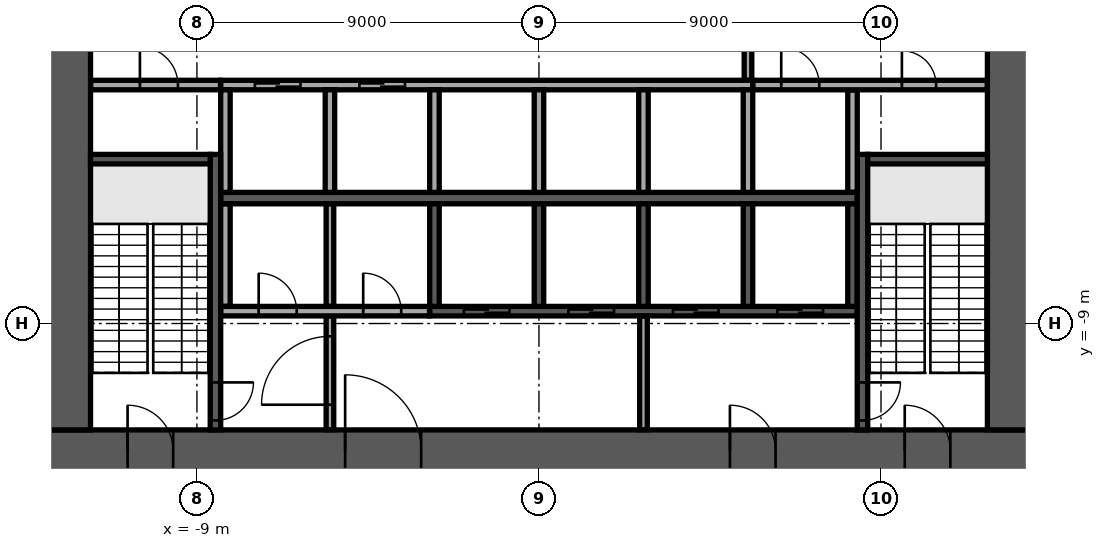
"""IFC4 building model, lengths in metres.
Left out: names, types, materials, properties, quantities, classifications, styles, units other than length and angle.
Written with IfcOpenShell. Run it as: python <this file> out.ifc"""

import sys

from ifc_helpers import new_model, si_unit, direction, frame, frame_2d, origin, place, context, subcontext, project, spatial, rectangle, extrude, element, fill, save


model = new_model("IFC4")
c1 = context("Model", 3, precision=1e-05, world=origin(), true_north=direction((0.0, 1.0)))
c2 = subcontext(c1, "Body", "Model", "MODEL_VIEW")
j1 = project(units=[si_unit("LENGTHUNIT", "METRE"), si_unit("PLANEANGLEUNIT", "RADIAN")], contexts=[c1])
p1 = place(None, origin())
s1 = spatial("IfcSite", under=j1, at=p1, CompositionType="ELEMENT")
p2 = place(p1, origin())
s2 = spatial("IfcBuilding", under=s1, at=p2, CompositionType="ELEMENT")
p3 = place(p2, frame((0.0, 0.0, 130.1)))
s3 = spatial("IfcBuildingStorey", under=s2, at=p3, CompositionType="ELEMENT", Elevation=130.1)
p4 = place(p3, frame((-12.9, -12.35, 0.0), z_axis=(0.0, 0.0, 1.0), x_axis=(1.0, 0.0, 0.0)))
e1 = element("IfcWall", 1, at=p4, inside=s3, PredefinedType="SHEAR", context=c2, shape_type="SweptSolid", body=[
    extrude(rectangle(XDim=25.8, YDim=1.1, at=frame_2d((12.9, 0.0))), origin(), (0.0, 0.0, 1.0), 5.2),
])
p5 = place(p4, frame((7.8, 0.0, 0.0)))
e2 = element("IfcOpeningElement", 2, at=p5, cuts=e1, PredefinedType="OPENING", context=c2, shape_type="SweptSolid", body=[
    extrude(rectangle(XDim=2.0, YDim=2.1, at=frame_2d((1.0, 1.05))), frame((0.0, 0.56, 0.0), z_axis=(0.0, -1.0, 0.0), x_axis=(1.0, 0.0, 0.0)), (0.0, 0.0, 1.0), 1.12),
])
p6 = place(p4, frame((17.925, 0.0, 0.0)))
e3 = element("IfcOpeningElement", 3, at=p6, cuts=e1, PredefinedType="OPENING", context=c2, shape_type="SweptSolid", body=[
    extrude(rectangle(XDim=1.2, YDim=2.1, at=frame_2d((0.6, 1.05))), frame((0.0, 0.56, 0.0), z_axis=(0.0, -1.0, 0.0), x_axis=(1.0, 0.0, 0.0)), (0.0, 0.0, 1.0), 1.12),
])
p7 = place(p4, frame((2.075, 0.0, 0.0)))
e4 = element("IfcOpeningElement", 4, at=p7, cuts=e1, PredefinedType="OPENING", context=c2, shape_type="SweptSolid", body=[
    extrude(rectangle(XDim=1.2, YDim=2.1, at=frame_2d((0.6, 1.05))), frame((0.0, 0.56, 0.0), z_axis=(0.0, -1.0, 0.0), x_axis=(1.0, 0.0, 0.0)), (0.0, 0.0, 1.0), 1.12),
])
p8 = place(p4, frame((22.525, 0.0, 0.0)))
e5 = element("IfcOpeningElement", 5, at=p8, cuts=e1, PredefinedType="OPENING", context=c2, shape_type="SweptSolid", body=[
    extrude(rectangle(XDim=1.2, YDim=2.1, at=frame_2d((0.6, 1.05))), frame((0.0, 0.56, 0.0), z_axis=(0.0, -1.0, 0.0), x_axis=(1.0, 0.0, 0.0)), (0.0, 0.0, 1.0), 1.12),
])
p9 = place(p3, frame((12.35, -11.8, 0.0), z_axis=(0.0, 0.0, 1.0), x_axis=(0.0, 1.0, 0.0)))
e6 = element("IfcWall", 6, at=p9, inside=s3, PredefinedType="SHEAR", context=c2, shape_type="SweptSolid", body=[
    extrude(rectangle(XDim=23.6, YDim=1.1, at=frame_2d((11.8, 0.0))), origin(), (0.0, 0.0, 1.0), 5.2),
])
p10 = place(p9, frame((10.6, 0.0, 0.0)))
e7 = element("IfcOpeningElement", 7, at=p10, cuts=e6, PredefinedType="OPENING", context=c2, shape_type="SweptSolid", body=[
    extrude(rectangle(XDim=2.4, YDim=2.4, at=frame_2d((1.2, 1.2))), frame((0.0, 0.56, 0.0), z_axis=(0.0, -1.0, 0.0), x_axis=(1.0, 0.0, 0.0)), (0.0, 0.0, 1.0), 1.12),
])
p11 = place(p3, frame((-12.35, -11.8, 0.0), z_axis=(0.0, 0.0, 1.0), x_axis=(0.0, 1.0, 0.0)))
e8 = element("IfcWall", 8, at=p11, inside=s3, PredefinedType="SHEAR", context=c2, shape_type="SweptSolid", body=[
    extrude(rectangle(XDim=23.6, YDim=1.1, at=frame_2d((11.8, 0.0))), origin(), (0.0, 0.0, 1.0), 5.2),
])
p12 = place(p11, frame((10.6, 0.0, 0.0)))
e9 = element("IfcOpeningElement", 9, at=p12, cuts=e8, PredefinedType="OPENING", context=c2, shape_type="SweptSolid", body=[
    extrude(rectangle(XDim=2.4, YDim=2.4, at=frame_2d((1.2, 1.2))), frame((0.0, 0.56, 0.0), z_axis=(0.0, -1.0, 0.0), x_axis=(1.0, 0.0, 0.0)), (0.0, 0.0, 1.0), 1.12),
])
p13 = place(p3, frame((-8.375, -5.7, 0.0), z_axis=(0.0, 0.0, 1.0), x_axis=(1.0, 0.0, 0.0)))
e10 = element("IfcWall", 10, at=p13, inside=s3, PredefinedType="SOLIDWALL", context=c2, shape_type="SweptSolid", body=[
    extrude(rectangle(XDim=16.75, YDim=0.3, at=frame_2d((8.375, 0.0))), origin(), (0.0, 0.0, 1.0), 5.2),
])
p14 = place(p3, frame((-8.375, -2.725, 0.0), z_axis=(0.0, 0.0, 1.0), x_axis=(1.0, 0.0, 0.0)))
e11 = element("IfcWall", 11, at=p14, inside=s3, PredefinedType="SOLIDWALL", context=c2, shape_type="SweptSolid", body=[
    extrude(rectangle(XDim=14.0, YDim=0.25, at=frame_2d((7.0, 0.0))), origin(), (0.0, 0.0, 1.0), 5.2),
])
p15 = place(p14, frame((0.9, 0.0, 0.0)))
e12 = element("IfcOpeningElement", 12, at=p15, cuts=e11, PredefinedType="OPENING", context=c2, shape_type="SweptSolid", body=[
    extrude(rectangle(XDim=1.2, YDim=2.1, at=frame_2d((0.6, 1.05))), frame((0.0, 0.135, 0.0), z_axis=(0.0, -1.0, 0.0), x_axis=(1.0, 0.0, 0.0)), (0.0, 0.0, 1.0), 0.27),
])
p16 = place(p14, frame((3.65, 0.0, 0.0)))
e13 = element("IfcOpeningElement", 13, at=p16, cuts=e11, PredefinedType="OPENING", context=c2, shape_type="SweptSolid", body=[
    extrude(rectangle(XDim=1.2, YDim=2.1, at=frame_2d((0.6, 1.05))), frame((0.0, 0.135, 0.0), z_axis=(0.0, -1.0, 0.0), x_axis=(1.0, 0.0, 0.0)), (0.0, 0.0, 1.0), 0.27),
])
for number, where, z_axis, x_axis in (
    (14, (-8.25, -5.55, 0.0), (0.0, 0.0, 1.0), (0.0, 1.0, 0.0)),
    (15, (-5.5, -5.55, 0.0), (0.0, 0.0, 1.0), (0.0, 1.0, 0.0)),
    (16, (-2.75, -5.55, 0.0), (0.0, 0.0, 1.0), (0.0, 1.0, 0.0)),
    (17, (0.0, -5.55, 0.0), (0.0, 0.0, 1.0), (0.0, 1.0, 0.0)),
    (18, (2.75, -5.55, 0.0), (0.0, 0.0, 1.0), (0.0, 1.0, 0.0)),
    (19, (5.5, -5.55, 0.0), (0.0, 0.0, 1.0), (0.0, 1.0, 0.0)),
):
    element("IfcWall", number, at=place(p3, frame(where, z_axis=z_axis, x_axis=x_axis)), inside=s3, PredefinedType="SOLIDWALL", context=c2, shape_type="SweptSolid", body=[
        extrude(rectangle(XDim=2.7, YDim=0.25, at=frame_2d((1.35, 0.0))), origin(), (0.0, 0.0, 1.0), 5.2),
    ])
p17 = place(p3, frame((-2.875, -8.675, 0.0), z_axis=(0.0, 0.0, 1.0), x_axis=(1.0, 0.0, 0.0)))
e20 = element("IfcWall", 20, at=p17, inside=s3, PredefinedType="SOLIDWALL", context=c2, shape_type="SweptSolid", body=[
    extrude(rectangle(XDim=11.25, YDim=0.25, at=frame_2d((5.625, 0.0))), origin(), (0.0, 0.0, 1.0), 5.2),
])
p18 = place(p17, frame((0.9, 0.0, 0.0)))
e21 = element("IfcOpeningElement", 21, at=p18, cuts=e20, PredefinedType="OPENING", context=c2, shape_type="SweptSolid", body=[
    extrude(rectangle(XDim=1.2, YDim=2.1, at=frame_2d((0.6, 1.05))), frame((0.0, 0.135, 0.0), z_axis=(0.0, -1.0, 0.0), x_axis=(1.0, 0.0, 0.0)), (0.0, 0.0, 1.0), 0.27),
])
p19 = place(p17, frame((3.65, 0.0, 0.0)))
e22 = element("IfcOpeningElement", 22, at=p19, cuts=e20, PredefinedType="OPENING", context=c2, shape_type="SweptSolid", body=[
    extrude(rectangle(XDim=1.2, YDim=2.1, at=frame_2d((0.6, 1.05))), frame((0.0, 0.135, 0.0), z_axis=(0.0, -1.0, 0.0), x_axis=(1.0, 0.0, 0.0)), (0.0, 0.0, 1.0), 0.27),
])
p20 = place(p17, frame((6.4, 0.0, 0.0)))
e23 = element("IfcOpeningElement", 23, at=p20, cuts=e20, PredefinedType="OPENING", context=c2, shape_type="SweptSolid", body=[
    extrude(rectangle(XDim=1.2, YDim=2.1, at=frame_2d((0.6, 1.05))), frame((0.0, 0.135, 0.0), z_axis=(0.0, -1.0, 0.0), x_axis=(1.0, 0.0, 0.0)), (0.0, 0.0, 1.0), 0.27),
])
p21 = place(p17, frame((9.15, 0.0, 0.0)))
e24 = element("IfcOpeningElement", 24, at=p21, cuts=e20, PredefinedType="OPENING", context=c2, shape_type="SweptSolid", body=[
    extrude(rectangle(XDim=1.2, YDim=2.1, at=frame_2d((0.6, 1.05))), frame((0.0, 0.135, 0.0), z_axis=(0.0, -1.0, 0.0), x_axis=(1.0, 0.0, 0.0)), (0.0, 0.0, 1.0), 0.27),
])
for number, where, z_axis, x_axis in (
    (25, (-2.75, -8.55, 0.0), (0.0, 0.0, 1.0), (0.0, 1.0, 0.0)),
    (26, (0.0, -8.55, 0.0), (0.0, 0.0, 1.0), (0.0, 1.0, 0.0)),
    (27, (2.75, -8.55, 0.0), (0.0, 0.0, 1.0), (0.0, 1.0, 0.0)),
    (28, (5.5, -8.55, 0.0), (0.0, 0.0, 1.0), (0.0, 1.0, 0.0)),
    (29, (8.25, -8.55, 0.0), (0.0, 0.0, 1.0), (0.0, 1.0, 0.0)),
):
    element("IfcWall", number, at=place(p3, frame(where, z_axis=z_axis, x_axis=x_axis)), inside=s3, PredefinedType="SOLIDWALL", context=c2, shape_type="SweptSolid", body=[
        extrude(rectangle(XDim=2.7, YDim=0.25, at=frame_2d((1.35, 0.0))), origin(), (0.0, 0.0, 1.0), 5.2),
    ])
p22 = place(p3, frame((-8.512, -4.55, 0.0), z_axis=(0.0, 0.0, 1.0), x_axis=(0.0, -1.0, 0.0)))
e30 = element("IfcWall", 30, at=p22, inside=s3, PredefinedType="SOLIDWALL", context=c2, shape_type="SweptSolid", body=[
    extrude(rectangle(XDim=7.25, YDim=0.275, at=frame_2d((3.625, 0.0))), origin(), (0.0, 0.0, 1.0), 5.2),
])
p23 = place(p22, frame((6.0, 0.0, 0.0)))
e31 = element("IfcOpeningElement", 31, at=p23, cuts=e30, PredefinedType="OPENING", context=c2, shape_type="SweptSolid", body=[
    extrude(rectangle(XDim=1.0, YDim=2.1, at=frame_2d((0.5, 1.05))), frame((0.0, 0.147, 0.0), z_axis=(0.0, -1.0, 0.0), x_axis=(1.0, 0.0, 0.0)), (0.0, 0.0, 1.0), 0.295),
])
p24 = place(p3, frame((-8.65, -4.675, 0.0), z_axis=(0.0, 0.0, 1.0), x_axis=(-1.0, 0.0, 0.0)))
e32 = element("IfcWall", 32, at=p24, inside=s3, PredefinedType="SOLIDWALL", context=c2, shape_type="SweptSolid", body=[
    extrude(rectangle(XDim=3.15, YDim=0.25, at=frame_2d((1.575, 0.0))), origin(), (0.0, 0.0, 1.0), 5.2),
])
p25 = place(p3, frame((8.512, -4.55, 0.0), z_axis=(0.0, 0.0, 1.0), x_axis=(0.0, -1.0, 0.0)))
e33 = element("IfcWall", 33, at=p25, inside=s3, PredefinedType="SOLIDWALL", context=c2, shape_type="SweptSolid", body=[
    extrude(rectangle(XDim=7.25, YDim=0.275, at=frame_2d((3.625, 0.0))), origin(), (0.0, 0.0, 1.0), 5.2),
])
p26 = place(p25, frame((6.0, 0.0, 0.0)))
e34 = element("IfcOpeningElement", 34, at=p26, cuts=e33, PredefinedType="OPENING", context=c2, shape_type="SweptSolid", body=[
    extrude(rectangle(XDim=1.0, YDim=2.1, at=frame_2d((0.5, 1.05))), frame((0.0, 0.147, 0.0), z_axis=(0.0, -1.0, 0.0), x_axis=(1.0, 0.0, 0.0)), (0.0, 0.0, 1.0), 0.295),
])
p27 = place(p3, frame((8.65, -4.675, 0.0), z_axis=(0.0, 0.0, 1.0), x_axis=(1.0, 0.0, 0.0)))
e35 = element("IfcWall", 35, at=p27, inside=s3, PredefinedType="SOLIDWALL", context=c2, shape_type="SweptSolid", body=[
    extrude(rectangle(XDim=3.15, YDim=0.25, at=frame_2d((1.575, 0.0))), origin(), (0.0, 0.0, 1.0), 5.2),
])
p28 = place(p3, frame((-5.5, -11.795, 0.0), z_axis=(0.0, 0.0, 1.0), x_axis=(0.0, 1.0, 0.0)))
e36 = element("IfcWall", 36, at=p28, inside=s3, PredefinedType="PARTITIONING", context=c2, shape_type="SweptSolid", body=[
    extrude(rectangle(XDim=2.99, YDim=0.2, at=frame_2d((1.495, 0.0))), origin(), (0.0, 0.0, 1.0), 5.2),
])
p29 = place(p28, frame((0.657, 0.0, 0.0)))
e37 = element("IfcOpeningElement", 37, at=p29, cuts=e36, PredefinedType="OPENING", context=c2, shape_type="SweptSolid", body=[
    extrude(rectangle(XDim=1.8, YDim=2.1, at=frame_2d((0.9, 1.05))), frame((0.0, 0.11, 0.0), z_axis=(0.0, -1.0, 0.0), x_axis=(1.0, 0.0, 0.0)), (0.0, 0.0, 1.0), 0.22),
])
p30 = place(p3, frame((2.75, -11.795, 0.0), z_axis=(0.0, 0.0, 1.0), x_axis=(0.0, 1.0, 0.0)))
e38 = element("IfcWall", 38, at=p30, inside=s3, PredefinedType="PARTITIONING", context=c2, shape_type="SweptSolid", body=[
    extrude(rectangle(XDim=2.99, YDim=0.2, at=frame_2d((1.495, 0.0))), origin(), (0.0, 0.0, 1.0), 5.2),
])
p31 = place(p3, frame((-8.37, -8.675, 0.0), z_axis=(0.0, 0.0, 1.0), x_axis=(1.0, 0.0, 0.0)))
e39 = element("IfcWall", 39, at=p31, inside=s3, PredefinedType="PARTITIONING", context=c2, shape_type="SweptSolid", body=[
    extrude(rectangle(XDim=5.49, YDim=0.25, at=frame_2d((2.745, 0.0))), origin(), (0.0, 0.0, 1.0), 5.2),
])
p32 = place(p31, frame((0.995, 0.0, 0.0)))
e40 = element("IfcOpeningElement", 40, at=p32, cuts=e39, PredefinedType="OPENING", context=c2, shape_type="SweptSolid", body=[
    extrude(rectangle(XDim=1.0, YDim=2.1, at=frame_2d((0.5, 1.05))), frame((0.0, 0.135, 0.0), z_axis=(0.0, -1.0, 0.0), x_axis=(1.0, 0.0, 0.0)), (0.0, 0.0, 1.0), 0.27),
])
p33 = place(p31, frame((3.745, 0.0, 0.0)))
e41 = element("IfcOpeningElement", 41, at=p33, cuts=e39, PredefinedType="OPENING", context=c2, shape_type="SweptSolid", body=[
    extrude(rectangle(XDim=1.0, YDim=2.1, at=frame_2d((0.5, 1.05))), frame((0.0, 0.135, 0.0), z_axis=(0.0, -1.0, 0.0), x_axis=(1.0, 0.0, 0.0)), (0.0, 0.0, 1.0), 0.27),
])
p34 = place(p3, frame((-8.25, -8.545, 0.0), z_axis=(0.0, 0.0, 1.0), x_axis=(0.0, 1.0, 0.0)))
e42 = element("IfcWall", 42, at=p34, inside=s3, PredefinedType="PARTITIONING", context=c2, shape_type="SweptSolid", body=[
    extrude(rectangle(XDim=2.69, YDim=0.25, at=frame_2d((1.345, 0.0))), origin(), (0.0, 0.0, 1.0), 5.2),
])
p35 = place(p3, frame((-5.5, -8.545, 0.0), z_axis=(0.0, 0.0, 1.0), x_axis=(0.0, 1.0, 0.0)))
e43 = element("IfcWall", 43, at=p35, inside=s3, PredefinedType="PARTITIONING", context=c2, shape_type="SweptSolid", body=[
    extrude(rectangle(XDim=2.69, YDim=0.2, at=frame_2d((1.345, 0.0))), origin(), (0.0, 0.0, 1.0), 5.2),
])
p36 = place(p3, frame((8.25, -5.545, 0.0), z_axis=(0.0, 0.0, 1.0), x_axis=(0.0, 1.0, 0.0)))
e44 = element("IfcWall", 44, at=p36, inside=s3, PredefinedType="PARTITIONING", context=c2, shape_type="SweptSolid", body=[
    extrude(rectangle(XDim=2.69, YDim=0.25, at=frame_2d((1.345, 0.0))), origin(), (0.0, 0.0, 1.0), 5.2),
])
p37 = place(p3, frame((-11.795, -2.725, 0.0), z_axis=(0.0, 0.0, 1.0), x_axis=(1.0, 0.0, 0.0)))
e45 = element("IfcWall", 45, at=p37, inside=s3, PredefinedType="PARTITIONING", context=c2, shape_type="SweptSolid", body=[
    extrude(rectangle(XDim=3.415, YDim=0.25, at=frame_2d((1.708, 0.0))), origin(), (0.0, 0.0, 1.0), 5.2),
])
p38 = place(p37, frame((1.295, 0.0, 0.0)))
e46 = element("IfcOpeningElement", 46, at=p38, cuts=e45, PredefinedType="OPENING", context=c2, shape_type="SweptSolid", body=[
    extrude(rectangle(XDim=1.0, YDim=2.1, at=frame_2d((0.5, 1.05))), frame((0.0, 0.135, 0.0), z_axis=(0.0, -1.0, 0.0), x_axis=(1.0, 0.0, 0.0)), (0.0, 0.0, 1.0), 0.27),
])
p39 = place(p3, frame((5.63, -2.725, 0.0), z_axis=(0.0, 0.0, 1.0), x_axis=(1.0, 0.0, 0.0)))
e47 = element("IfcWall", 47, at=p39, inside=s3, PredefinedType="PARTITIONING", context=c2, shape_type="SweptSolid", body=[
    extrude(rectangle(XDim=6.165, YDim=0.25, at=frame_2d((3.083, 0.0))), origin(), (0.0, 0.0, 1.0), 5.2),
])
p40 = place(p39, frame((0.745, 0.0, 0.0)))
e48 = element("IfcOpeningElement", 48, at=p40, cuts=e47, PredefinedType="OPENING", context=c2, shape_type="SweptSolid", body=[
    extrude(rectangle(XDim=1.0, YDim=2.1, at=frame_2d((0.5, 1.05))), frame((0.0, 0.135, 0.0), z_axis=(0.0, -1.0, 0.0), x_axis=(1.0, 0.0, 0.0)), (0.0, 0.0, 1.0), 0.27),
])
p41 = place(p39, frame((3.92, 0.0, 0.0)))
e49 = element("IfcOpeningElement", 49, at=p41, cuts=e47, PredefinedType="OPENING", context=c2, shape_type="SweptSolid", body=[
    extrude(rectangle(XDim=0.9, YDim=2.1, at=frame_2d((0.45, 1.05))), frame((0.0, 0.135, 0.0), z_axis=(0.0, -1.0, 0.0), x_axis=(1.0, 0.0, 0.0)), (0.0, 0.0, 1.0), 0.27),
])
p42 = place(p3, frame((5.5, -2.595, 0.0), z_axis=(0.0, 0.0, 1.0), x_axis=(0.0, 1.0, 0.0)))
e50 = element("IfcWall", 50, at=p42, inside=s3, PredefinedType="PARTITIONING", context=c2, shape_type="SweptSolid", body=[
    extrude(rectangle(XDim=5.19, YDim=0.2, at=frame_2d((2.595, 0.0))), origin(), (0.0, 0.0, 1.0), 5.2),
])
p43 = place(p42, frame((1.395, 0.0, 0.0)))
e51 = element("IfcOpeningElement", 51, at=p43, cuts=e50, PredefinedType="OPENING", context=c2, shape_type="SweptSolid", body=[
    extrude(rectangle(XDim=2.4, YDim=2.4, at=frame_2d((1.2, 1.2))), frame((0.0, 0.11, 0.0), z_axis=(0.0, -1.0, 0.0), x_axis=(1.0, 0.0, 0.0)), (0.0, 0.0, 1.0), 0.22),
])
p44 = place(p5, origin())
e52 = element("IfcDoor", 52, at=p44, inside=s3, OperationType="SINGLE_SWING_LEFT", PredefinedType="DOOR", context=c2, shape_type="SweptSolid", body=[
    extrude(rectangle(XDim=2.0, YDim=2.1, at=frame_2d((1.0, 1.05))), frame((0.0, 0.025, 0.0), z_axis=(0.0, -1.0, 0.0), x_axis=(1.0, 0.0, 0.0)), (0.0, 0.0, 1.0), 0.05),
])
fill(e2, e52)
p45 = place(p6, origin())
e53 = element("IfcDoor", 53, at=p45, inside=s3, OperationType="SINGLE_SWING_LEFT", PredefinedType="DOOR", context=c2, shape_type="SweptSolid", body=[
    extrude(rectangle(XDim=1.2, YDim=2.1, at=frame_2d((0.6, 1.05))), frame((0.0, 0.025, 0.0), z_axis=(0.0, -1.0, 0.0), x_axis=(1.0, 0.0, 0.0)), (0.0, 0.0, 1.0), 0.05),
])
fill(e3, e53)
p46 = place(p7, origin())
e54 = element("IfcDoor", 54, at=p46, inside=s3, OperationType="SINGLE_SWING_LEFT", PredefinedType="DOOR", context=c2, shape_type="SweptSolid", body=[
    extrude(rectangle(XDim=1.2, YDim=2.1, at=frame_2d((0.6, 1.05))), frame((0.0, 0.025, 0.0), z_axis=(0.0, -1.0, 0.0), x_axis=(1.0, 0.0, 0.0)), (0.0, 0.0, 1.0), 0.05),
])
fill(e4, e54)
p47 = place(p8, origin())
e55 = element("IfcDoor", 55, at=p47, inside=s3, OperationType="SINGLE_SWING_LEFT", PredefinedType="DOOR", context=c2, shape_type="SweptSolid", body=[
    extrude(rectangle(XDim=1.2, YDim=2.1, at=frame_2d((0.6, 1.05))), frame((0.0, 0.025, 0.0), z_axis=(0.0, -1.0, 0.0), x_axis=(1.0, 0.0, 0.0)), (0.0, 0.0, 1.0), 0.05),
])
fill(e5, e55)
p48 = place(p15, origin())
e56 = element("IfcDoor", 56, at=p48, inside=s3, OperationType="DOUBLE_DOOR_SLIDING", PredefinedType="DOOR", context=c2, shape_type="SweptSolid", body=[
    extrude(rectangle(XDim=1.2, YDim=2.1, at=frame_2d((0.6, 1.05))), frame((0.0, 0.025, 0.0), z_axis=(0.0, -1.0, 0.0), x_axis=(1.0, 0.0, 0.0)), (0.0, 0.0, 1.0), 0.05),
])
fill(e12, e56)
p49 = place(p16, origin())
e57 = element("IfcDoor", 57, at=p49, inside=s3, OperationType="DOUBLE_DOOR_SLIDING", PredefinedType="DOOR", context=c2, shape_type="SweptSolid", body=[
    extrude(rectangle(XDim=1.2, YDim=2.1, at=frame_2d((0.6, 1.05))), frame((0.0, 0.025, 0.0), z_axis=(0.0, -1.0, 0.0), x_axis=(1.0, 0.0, 0.0)), (0.0, 0.0, 1.0), 0.05),
])
fill(e13, e57)
p50 = place(p18, origin())
e58 = element("IfcDoor", 58, at=p50, inside=s3, OperationType="DOUBLE_DOOR_SLIDING", PredefinedType="DOOR", context=c2, shape_type="SweptSolid", body=[
    extrude(rectangle(XDim=1.2, YDim=2.1, at=frame_2d((0.6, 1.05))), frame((0.0, 0.025, 0.0), z_axis=(0.0, -1.0, 0.0), x_axis=(1.0, 0.0, 0.0)), (0.0, 0.0, 1.0), 0.05),
])
fill(e21, e58)
p51 = place(p19, origin())
e59 = element("IfcDoor", 59, at=p51, inside=s3, OperationType="DOUBLE_DOOR_SLIDING", PredefinedType="DOOR", context=c2, shape_type="SweptSolid", body=[
    extrude(rectangle(XDim=1.2, YDim=2.1, at=frame_2d((0.6, 1.05))), frame((0.0, 0.025, 0.0), z_axis=(0.0, -1.0, 0.0), x_axis=(1.0, 0.0, 0.0)), (0.0, 0.0, 1.0), 0.05),
])
fill(e22, e59)
p52 = place(p20, origin())
e60 = element("IfcDoor", 60, at=p52, inside=s3, OperationType="DOUBLE_DOOR_SLIDING", PredefinedType="DOOR", context=c2, shape_type="SweptSolid", body=[
    extrude(rectangle(XDim=1.2, YDim=2.1, at=frame_2d((0.6, 1.05))), frame((0.0, 0.025, 0.0), z_axis=(0.0, -1.0, 0.0), x_axis=(1.0, 0.0, 0.0)), (0.0, 0.0, 1.0), 0.05),
])
fill(e23, e60)
p53 = place(p21, origin())
e61 = element("IfcDoor", 61, at=p53, inside=s3, OperationType="DOUBLE_DOOR_SLIDING", PredefinedType="DOOR", context=c2, shape_type="SweptSolid", body=[
    extrude(rectangle(XDim=1.2, YDim=2.1, at=frame_2d((0.6, 1.05))), frame((0.0, 0.025, 0.0), z_axis=(0.0, -1.0, 0.0), x_axis=(1.0, 0.0, 0.0)), (0.0, 0.0, 1.0), 0.05),
])
fill(e24, e61)
p54 = place(p23, origin())
e62 = element("IfcDoor", 62, at=p54, inside=s3, OperationType="SINGLE_SWING_LEFT", PredefinedType="DOOR", context=c2, shape_type="SweptSolid", body=[
    extrude(rectangle(XDim=1.0, YDim=2.1, at=frame_2d((0.5, 1.05))), frame((0.0, 0.025, 0.0), z_axis=(0.0, -1.0, 0.0), x_axis=(1.0, 0.0, 0.0)), (0.0, 0.0, 1.0), 0.05),
])
fill(e31, e62)
p55 = place(p26, origin())
e63 = element("IfcDoor", 63, at=p55, inside=s3, OperationType="SINGLE_SWING_LEFT", PredefinedType="DOOR", context=c2, shape_type="SweptSolid", body=[
    extrude(rectangle(XDim=1.0, YDim=2.1, at=frame_2d((0.5, 1.05))), frame((0.0, 0.025, 0.0), z_axis=(0.0, -1.0, 0.0), x_axis=(1.0, 0.0, 0.0)), (0.0, 0.0, 1.0), 0.05),
])
fill(e34, e63)
p56 = place(p32, origin())
e64 = element("IfcDoor", 64, at=p56, inside=s3, OperationType="SINGLE_SWING_LEFT", PredefinedType="DOOR", context=c2, shape_type="SweptSolid", body=[
    extrude(rectangle(XDim=1.0, YDim=2.1, at=frame_2d((0.5, 1.05))), frame((0.0, 0.025, 0.0), z_axis=(0.0, -1.0, 0.0), x_axis=(1.0, 0.0, 0.0)), (0.0, 0.0, 1.0), 0.05),
])
fill(e40, e64)
p57 = place(p33, origin())
e65 = element("IfcDoor", 65, at=p57, inside=s3, OperationType="SINGLE_SWING_LEFT", PredefinedType="DOOR", context=c2, shape_type="SweptSolid", body=[
    extrude(rectangle(XDim=1.0, YDim=2.1, at=frame_2d((0.5, 1.05))), frame((0.0, 0.025, 0.0), z_axis=(0.0, -1.0, 0.0), x_axis=(1.0, 0.0, 0.0)), (0.0, 0.0, 1.0), 0.05),
])
fill(e41, e65)
p58 = place(p38, origin())
e66 = element("IfcDoor", 66, at=p58, inside=s3, OperationType="SINGLE_SWING_LEFT", PredefinedType="DOOR", context=c2, shape_type="SweptSolid", body=[
    extrude(rectangle(XDim=1.0, YDim=2.1, at=frame_2d((0.5, 1.05))), frame((0.0, 0.025, 0.0), z_axis=(0.0, -1.0, 0.0), x_axis=(1.0, 0.0, 0.0)), (0.0, 0.0, 1.0), 0.05),
])
fill(e46, e66)
p59 = place(p40, origin())
e67 = element("IfcDoor", 67, at=p59, inside=s3, OperationType="SINGLE_SWING_LEFT", PredefinedType="DOOR", context=c2, shape_type="SweptSolid", body=[
    extrude(rectangle(XDim=1.0, YDim=2.1, at=frame_2d((0.5, 1.05))), frame((0.0, 0.025, 0.0), z_axis=(0.0, -1.0, 0.0), x_axis=(1.0, 0.0, 0.0)), (0.0, 0.0, 1.0), 0.05),
])
fill(e48, e67)
p60 = place(p41, origin())
e68 = element("IfcDoor", 68, at=p60, inside=s3, OperationType="SINGLE_SWING_LEFT", PredefinedType="DOOR", context=c2, shape_type="SweptSolid", body=[
    extrude(rectangle(XDim=0.9, YDim=2.1, at=frame_2d((0.45, 1.05))), frame((0.0, 0.025, 0.0), z_axis=(0.0, -1.0, 0.0), x_axis=(1.0, 0.0, 0.0)), (0.0, 0.0, 1.0), 0.05),
])
fill(e49, e68)
p61 = place(p29, origin())
e69 = element("IfcDoor", 69, at=p61, inside=s3, OperationType="SINGLE_SWING_LEFT", PredefinedType="DOOR", context=c2, shape_type="SweptSolid", body=[
    extrude(rectangle(XDim=1.8, YDim=2.1, at=frame_2d((0.9, 1.05))), frame((0.0, 0.025, 0.0), z_axis=(0.0, -1.0, 0.0), x_axis=(1.0, 0.0, 0.0)), (0.0, 0.0, 1.0), 0.05),
])
fill(e37, e69)
save(model, sys.argv[1])
